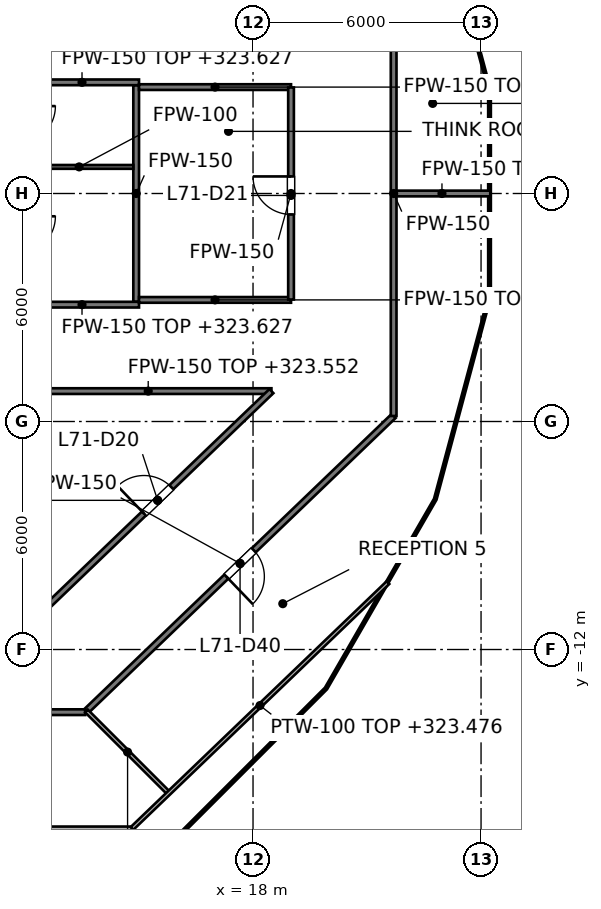
"""IFC4 building model, lengths in metres.
Left out: names, types, materials, properties, quantities, classifications, styles, units other than length and angle.
Written with IfcOpenShell. Run it as: python <this file> out.ifc"""

import sys

from ifc_helpers import new_model, si_unit, direction, frame, frame_2d, origin, place, context, subcontext, project, spatial, rectangle, extrude, element, fill, save


model = new_model("IFC4")
c1 = context("Model", 3, precision=1e-05, world=origin(), true_north=direction((0.0, 1.0)))
c2 = subcontext(c1, "Body", "Model", "MODEL_VIEW")
j1 = project(units=[si_unit("LENGTHUNIT", "METRE"), si_unit("PLANEANGLEUNIT", "RADIAN")], contexts=[c1])
p1 = place(None, origin())
s1 = spatial("IfcSite", under=j1, at=p1, CompositionType="ELEMENT")
p2 = place(p1, origin())
s2 = spatial("IfcBuilding", under=s1, at=p2, CompositionType="ELEMENT")
p3 = place(p2, frame((0.0, 0.0, 320.4)))
s3 = spatial("IfcBuildingStorey", under=s2, at=p3, CompositionType="ELEMENT", Elevation=320.4)
p4 = place(p3, frame((14.925, -2.85, 0.0), z_axis=(0.0, 0.0, 1.0), x_axis=(0.0, 1.0, 0.0)))
e1 = element("IfcWall", 1, at=p4, inside=s3, PredefinedType="PARTITIONING", context=c2, shape_type="SweptSolid", body=[
    extrude(rectangle(XDim=5.7, YDim=0.15, at=frame_2d((2.85, 0.0))), origin(), (0.0, 0.0, 1.0), 3.076),
])
for number, where, z_axis, x_axis in (
    (2, (12.0, 2.925, 0.0), (0.0, 0.0, 1.0), (1.0, 0.0, 0.0)),
    (3, (12.0, -2.925, 0.0), (0.0, 0.0, 1.0), (1.0, 0.0, 0.0)),
):
    element("IfcWall", number, at=place(p3, frame(where, z_axis=z_axis, x_axis=x_axis)), inside=s3, PredefinedType="PARTITIONING", context=c2, shape_type="SweptSolid", body=[
        extrude(rectangle(XDim=3.0, YDim=0.15, at=frame_2d((1.5, 0.0))), origin(), (0.0, 0.0, 1.0), 3.228),
    ])
p5 = place(p3, frame((12.0, 0.7, 0.0), z_axis=(0.0, 0.0, 1.0), x_axis=(1.0, 0.0, 0.0)))
e4 = element("IfcWall", 4, at=p5, inside=s3, PredefinedType="PARTITIONING", context=c2, shape_type="SweptSolid", body=[
    extrude(rectangle(XDim=2.85, YDim=0.1, at=frame_2d((1.425, 0.0))), origin(), (0.0, 0.0, 1.0), 3.85),
])
p6 = place(p3, frame((-13.584, -13.649, 0.0), z_axis=(0.0, 0.0, 1.0), x_axis=(1.0, 0.0, 0.0)))
e5 = element("IfcWall", 5, at=p6, inside=s3, PredefinedType="PARTITIONING", context=c2, shape_type="SweptSolid", body=[
    extrude(rectangle(XDim=27.168, YDim=0.15, at=frame_2d((13.584, 0.0))), origin(), (0.0, 0.0, 1.0), 2.927),
])
p7 = place(p6, frame((10.922, 0.0, 0.0)))
e6 = element("IfcOpeningElement", 6, at=p7, cuts=e5, PredefinedType="OPENING", context=c2, shape_type="SweptSolid", body=[
    extrude(rectangle(XDim=1.0, YDim=2.1, at=frame_2d((0.5, 1.05))), frame((0.0, 0.075, 0.0), z_axis=(0.0, -1.0, 0.0), x_axis=(1.0, 0.0, 0.0)), (0.0, 0.0, 1.0), 0.15),
])
p8 = place(p6, frame((21.654, 0.0, 0.0)))
e7 = element("IfcOpeningElement", 7, at=p8, cuts=e5, PredefinedType="OPENING", context=c2, shape_type="SweptSolid", body=[
    extrude(rectangle(XDim=1.0, YDim=2.1, at=frame_2d((0.5, 1.05))), frame((0.0, 0.075, 0.0), z_axis=(0.0, -1.0, 0.0), x_axis=(1.0, 0.0, 0.0)), (0.0, 0.0, 1.0), 0.15),
])
p9 = place(p3, frame((12.0, -5.2, 0.0), z_axis=(0.0, 0.0, 1.0), x_axis=(1.0, 0.0, 0.0)))
e8 = element("IfcWall", 8, at=p9, inside=s3, PredefinedType="PARTITIONING", context=c2, shape_type="SweptSolid", body=[
    extrude(rectangle(XDim=6.484, YDim=0.15, at=frame_2d((3.242, 0.0))), origin(), (0.0, 0.0, 1.0), 3.152),
])
p10 = place(p3, frame((15.0, -2.8, 0.0), z_axis=(0.0, 0.0, 1.0), x_axis=(1.0, 0.0, 0.0)))
e9 = element("IfcWall", 9, at=p10, inside=s3, PredefinedType="PARTITIONING", context=c2, shape_type="SweptSolid", body=[
    extrude(rectangle(XDim=4.0, YDim=0.15, at=frame_2d((2.0, 0.0))), origin(), (0.0, 0.0, 1.0), 3.85),
])
p11 = place(p3, frame((21.7, 0.0, 0.0), z_axis=(0.0, 0.0, 1.0), x_axis=(1.0, 0.0, 0.0)))
e10 = element("IfcWall", 10, at=p11, inside=s3, PredefinedType="PARTITIONING", context=c2, shape_type="SweptSolid", body=[
    extrude(rectangle(XDim=2.543, YDim=0.15, at=frame_2d((1.271, 0.0))), origin(), (0.0, 0.0, 1.0), 3.228),
])
p12 = place(p3, frame((15.0, 2.8, 0.0), z_axis=(0.0, 0.0, 1.0), x_axis=(1.0, 0.0, 0.0)))
e11 = element("IfcWall", 11, at=p12, inside=s3, PredefinedType="PARTITIONING", context=c2, shape_type="SweptSolid", body=[
    extrude(rectangle(XDim=4.0, YDim=0.15, at=frame_2d((2.0, 0.0))), origin(), (0.0, 0.0, 1.0), 3.85),
])
p13 = place(p3, frame((13.617, -13.617, 0.0), z_axis=(0.0, 0.0, 1.0), x_axis=(0.721264539741, 0.692659702677, 0.0)))
e12 = element("IfcWall", 12, at=p13, inside=s3, PredefinedType="PARTITIONING", context=c2, shape_type="SweptSolid", body=[
    extrude(rectangle(XDim=11.206, YDim=0.15, at=frame_2d((5.603, 0.0))), origin(), (0.0, 0.0, 1.0), 3.076),
])
p14 = place(p13, frame((5.104, 0.0, 0.0)))
e13 = element("IfcOpeningElement", 13, at=p14, cuts=e12, PredefinedType="OPENING", context=c2, shape_type="SweptSolid", body=[
    extrude(rectangle(XDim=1.0, YDim=2.1, at=frame_2d((0.5, 1.05))), frame((0.0, 0.075, 0.0), z_axis=(0.0, -1.0, 0.0), x_axis=(1.0, 0.0, 0.0)), (0.0, 0.0, 1.0), 0.15),
])
p15 = place(p3, frame((12.498, -10.949, 0.0), z_axis=(0.0, 0.0, 1.0), x_axis=(0.721258572397, 0.692665916401, 0.0)))
e14 = element("IfcWall", 14, at=p15, inside=s3, PredefinedType="PARTITIONING", context=c2, shape_type="SweptSolid", body=[
    extrude(rectangle(XDim=8.3, YDim=0.15, at=frame_2d((4.15, 0.0))), origin(), (0.0, 0.0, 1.0), 3.076),
])
p16 = place(p15, frame((3.649, 0.0, 0.0)))
e15 = element("IfcOpeningElement", 15, at=p16, cuts=e14, PredefinedType="OPENING", context=c2, shape_type="SweptSolid", body=[
    extrude(rectangle(XDim=1.0, YDim=2.1, at=frame_2d((0.5, 1.05))), frame((0.0, 0.075, 0.0), z_axis=(0.0, -1.0, 0.0), x_axis=(1.0, 0.0, 0.0)), (0.0, 0.0, 1.0), 0.15),
])
p17 = place(p3, frame((21.7, -5.855, 0.0), z_axis=(0.0, 0.0, 1.0), x_axis=(0.0, 1.0, 0.0)))
e16 = element("IfcWall", 16, at=p17, inside=s3, PredefinedType="PARTITIONING", context=c2, shape_type="SweptSolid", body=[
    extrude(rectangle(XDim=11.71, YDim=0.15, at=frame_2d((5.855, 0.0))), origin(), (0.0, 0.0, 1.0), 3.076),
])
p18 = place(p3, frame((19.0, -2.79, 0.0), z_axis=(0.0, 0.0, 1.0), x_axis=(0.0, 1.0, 0.0)))
e17 = element("IfcWall", 17, at=p18, inside=s3, PredefinedType="PARTITIONING", context=c2, shape_type="SweptSolid", body=[
    extrude(rectangle(XDim=5.58, YDim=0.15, at=frame_2d((2.79, 0.0))), origin(), (0.0, 0.0, 1.0), 3.076),
])
p19 = place(p18, frame((2.239, 0.0, 0.0)))
e18 = element("IfcOpeningElement", 18, at=p19, cuts=e17, PredefinedType="OPENING", context=c2, shape_type="SweptSolid", body=[
    extrude(rectangle(XDim=1.0, YDim=2.1, at=frame_2d((0.5, 1.05))), frame((0.0, 0.075, 0.0), z_axis=(0.0, -1.0, 0.0), x_axis=(1.0, 0.0, 0.0)), (0.0, 0.0, 1.0), 0.15),
])
p20 = place(p3, frame((13.617, -13.617, 0.0), z_axis=(0.0, 0.0, 1.0), x_axis=(0.707106781187, -0.707106781187, 0.0)))
e19 = element("IfcWall", 19, at=p20, inside=s3, PredefinedType="PARTITIONING", context=c2, shape_type="SweptSolid", body=[
    extrude(rectangle(XDim=3.061, YDim=0.1, at=frame_2d((1.53, 0.0))), origin(), (0.0, 0.0, 1.0), 3.85),
])
p21 = place(p3, frame((-14.815, -16.709, 0.0), z_axis=(0.0, 0.0, 1.0), x_axis=(1.0, 0.0, 0.0)))
e20 = element("IfcWall", 20, at=p21, inside=s3, PredefinedType="PARTITIONING", context=c2, shape_type="SweptSolid", body=[
    extrude(rectangle(XDim=29.63, YDim=0.1, at=frame_2d((14.815, 0.0))), origin(), (0.0, 0.0, 1.0), 2.927),
])
p22 = place(p21, frame((11.78, 0.0, 0.0)))
e21 = element("IfcOpeningElement", 21, at=p22, cuts=e20, PredefinedType="OPENING", context=c2, shape_type="SweptSolid", body=[
    extrude(rectangle(XDim=0.9, YDim=2.1, at=frame_2d((0.45, 1.05))), frame((0.0, 0.05, 0.0), z_axis=(0.0, -1.0, 0.0), x_axis=(1.0, 0.0, 0.0)), (0.0, 0.0, 1.0), 0.1),
])
p23 = place(p21, frame((23.408, 0.0, 0.0)))
e22 = element("IfcOpeningElement", 22, at=p23, cuts=e20, PredefinedType="OPENING", context=c2, shape_type="SweptSolid", body=[
    extrude(rectangle(XDim=0.9, YDim=2.1, at=frame_2d((0.45, 1.05))), frame((0.0, 0.05, 0.0), z_axis=(0.0, -1.0, 0.0), x_axis=(1.0, 0.0, 0.0)), (0.0, 0.0, 1.0), 0.1),
])
p24 = place(p3, frame((14.815, -16.709, 0.0), z_axis=(0.0, 0.0, 1.0), x_axis=(0.721235811033, 0.692689616555, 0.0)))
e23 = element("IfcWall", 23, at=p24, inside=s3, PredefinedType="PARTITIONING", context=c2, shape_type="SweptSolid", body=[
    extrude(rectangle(XDim=9.339, YDim=0.1, at=frame_2d((4.67, 0.0))), origin(), (0.0, 0.0, 1.0), 3.076),
])
p25 = place(p16, origin())
e24 = element("IfcDoor", 24, at=p25, inside=s3, OperationType="SINGLE_SWING_LEFT", PredefinedType="DOOR", context=c2, shape_type="SweptSolid", body=[
    extrude(rectangle(XDim=1.0, YDim=2.1, at=frame_2d((0.5, 1.05))), frame((0.0, 0.025, 0.0), z_axis=(0.0, -1.0, 0.0), x_axis=(1.0, 0.0, 0.0)), (0.0, 0.0, 1.0), 0.05),
])
fill(e15, e24)
p26 = place(p19, origin())
e25 = element("IfcDoor", 25, at=p26, inside=s3, OperationType="SINGLE_SWING_RIGHT", PredefinedType="DOOR", context=c2, shape_type="SweptSolid", body=[
    extrude(rectangle(XDim=1.0, YDim=2.1, at=frame_2d((0.5, 1.05))), frame((0.0, 0.025, 0.0), z_axis=(0.0, -1.0, 0.0), x_axis=(1.0, 0.0, 0.0)), (0.0, 0.0, 1.0), 0.05),
])
fill(e18, e25)
p27 = place(p14, origin())
e26 = element("IfcDoor", 26, at=p27, inside=s3, OperationType="SINGLE_SWING_LEFT", PredefinedType="DOOR", context=c2, shape_type="SweptSolid", body=[
    extrude(rectangle(XDim=1.0, YDim=2.1, at=frame_2d((0.5, 1.05))), frame((0.0, 0.025, 0.0), z_axis=(0.0, -1.0, 0.0), x_axis=(1.0, 0.0, 0.0)), (0.0, 0.0, 1.0), 0.05),
])
fill(e13, e26)
save(model, sys.argv[1])
